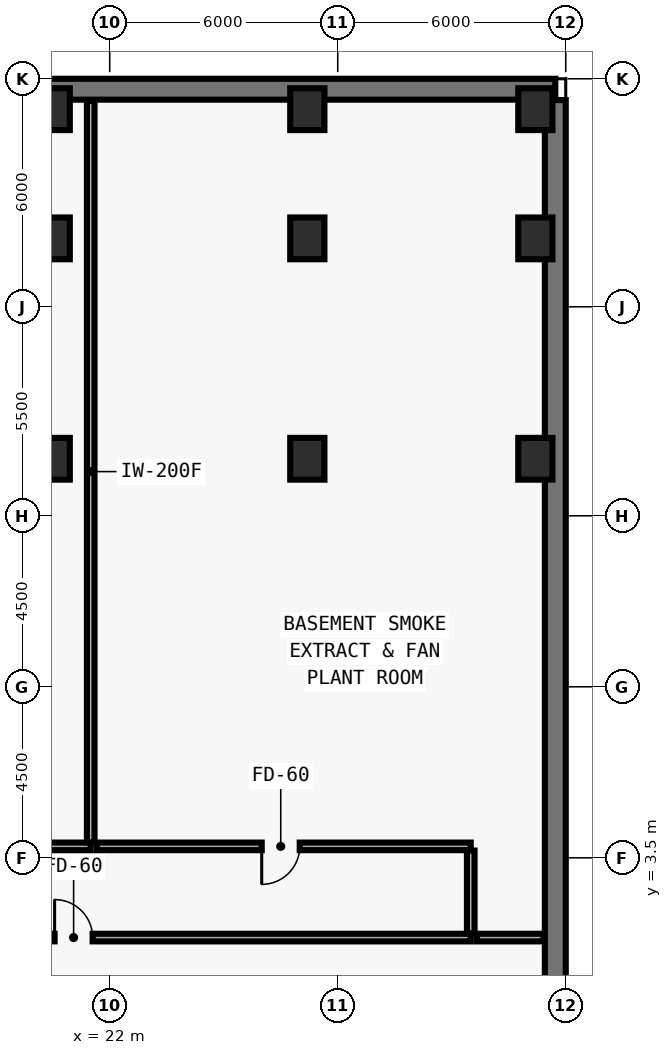
"""IFC4 building model, lengths in metres.
Left out: names, types, materials, properties, quantities, classifications, styles, units other than length and angle.
Written with IfcOpenShell. Run it as: python <this file> out.ifc"""

import sys

from ifc_helpers import new_model, si_unit, direction, frame, frame_2d, origin, origin_2d, place, context, subcontext, project, spatial, rectangle, extrude, element, fill, save


model = new_model("IFC4")
c1 = context("Model", 3, precision=1e-05, world=origin(), true_north=direction((0.0, 1.0)))
c2 = subcontext(c1, "Body", "Model", "MODEL_VIEW")
j1 = project(units=[si_unit("LENGTHUNIT", "METRE"), si_unit("PLANEANGLEUNIT", "RADIAN")], contexts=[c1])
p1 = place(None, origin())
s1 = spatial("IfcSite", under=j1, at=p1, CompositionType="ELEMENT")
p2 = place(p1, origin())
s2 = spatial("IfcBuilding", under=s1, at=p2, CompositionType="ELEMENT")
p3 = place(p2, frame((0.0, 0.0, -9.0)))
s3 = spatial("IfcBuildingStorey", under=s2, at=p3, CompositionType="ELEMENT", Elevation=-9.0)
p4 = place(p3, frame((-33.725, 23.725, 0.0), z_axis=(0.0, 0.0, 1.0), x_axis=(1.0, 0.0, 0.0)))
e1 = element("IfcWall", 1, at=p4, inside=s3, PredefinedType="SOLIDWALL", context=c2, shape_type="SweptSolid", body=[
    extrude(rectangle(XDim=67.45, YDim=0.55, at=frame_2d((33.725, 0.0))), origin(), (0.0, 0.0, 1.0), 4.492),
])
p5 = place(p3, frame((33.725, -23.44, 0.0), z_axis=(0.0, 0.0, 1.0), x_axis=(0.0, 1.0, 0.0)))
e2 = element("IfcWall", 2, at=p5, inside=s3, PredefinedType="SOLIDWALL", context=c2, shape_type="SweptSolid", body=[
    extrude(rectangle(XDim=46.88, YDim=0.55, at=frame_2d((23.44, 0.0))), origin(), (0.0, 0.0, 1.0), 4.492),
])
for number, where, z_axis, x_axis in (
    (3, (20.5, 14.0, 0.0), (0.0, 0.0, 1.0), (1.0, 0.0, 0.0)),
    (4, (20.5, 19.8, 0.0), (0.0, 0.0, 1.0), (1.0, 0.0, 0.0)),
    (5, (20.5, 23.2, 0.0), (0.0, 0.0, 1.0), (1.0, 0.0, 0.0)),
    (6, (27.2, 14.0, 0.0), (0.0, 0.0, 1.0), (1.0, 0.0, 0.0)),
    (7, (27.2, 19.8, 0.0), (0.0, 0.0, 1.0), (1.0, 0.0, 0.0)),
    (8, (27.2, 23.2, 0.0), (0.0, 0.0, 1.0), (1.0, 0.0, 0.0)),
    (9, (33.2, 14.0, 0.0), (0.0, 0.0, 1.0), (1.0, 0.0, 0.0)),
    (10, (33.2, 19.8, 0.0), (0.0, 0.0, 1.0), (1.0, 0.0, 0.0)),
    (11, (33.2, 23.2, 0.0), (0.0, 0.0, 1.0), (1.0, 0.0, 0.0)),
):
    element("IfcColumn", number, at=place(p3, frame(where, z_axis=z_axis, x_axis=x_axis)), inside=s3, PredefinedType="COLUMN", context=c2, shape_type="SweptSolid", body=[
        extrude(rectangle(XDim=0.9, YDim=1.1, at=origin_2d()), origin(), (0.0, 0.0, 1.0), 4.475),
    ])
p6 = place(p3, frame((10.6, 1.4, 0.0), z_axis=(0.0, 0.0, 1.0), x_axis=(1.0, 0.0, 0.0)))
e12 = element("IfcWall", 12, at=p6, inside=s3, PredefinedType="MOVABLE", context=c2, shape_type="SweptSolid", body=[
    extrude(rectangle(XDim=20.9, YDim=0.2, at=frame_2d((10.45, 0.0))), origin(), (0.0, 0.0, 1.0), 4.18),
])
p7 = place(p6, frame((9.95, 0.0, 0.0)))
e13 = element("IfcOpeningElement", 13, at=p7, cuts=e12, PredefinedType="OPENING", context=c2, shape_type="SweptSolid", body=[
    extrude(rectangle(XDim=1.0, YDim=2.1, at=frame_2d((0.5, 1.05))), frame((0.0, 0.11, 0.0), z_axis=(0.0, -1.0, 0.0), x_axis=(1.0, 0.0, 0.0)), (0.0, 0.0, 1.0), 0.22),
])
p8 = place(p3, frame((21.5, 3.8, 0.0), z_axis=(0.0, 0.0, 1.0), x_axis=(-1.0, 0.0, 0.0)))
e14 = element("IfcWall", 14, at=p8, inside=s3, PredefinedType="MOVABLE", context=c2, shape_type="SweptSolid", body=[
    extrude(rectangle(XDim=10.9, YDim=0.2, at=frame_2d((5.45, 0.0))), origin(), (0.0, 0.0, 1.0), 4.18),
])
p9 = place(p8, frame((4.95, 0.0, 0.0)))
e15 = element("IfcOpeningElement", 15, at=p9, cuts=e14, PredefinedType="OPENING", context=c2, shape_type="SweptSolid", body=[
    extrude(rectangle(XDim=1.0, YDim=2.1, at=frame_2d((0.5, 1.05))), frame((0.0, 0.11, 0.0), z_axis=(0.0, -1.0, 0.0), x_axis=(1.0, 0.0, 0.0)), (0.0, 0.0, 1.0), 0.22),
])
p10 = place(p3, frame((31.5, 3.8, 0.0), z_axis=(0.0, 0.0, 1.0), x_axis=(-1.0, 0.0, 0.0)))
e16 = element("IfcWall", 16, at=p10, inside=s3, PredefinedType="MOVABLE", context=c2, shape_type="SweptSolid", body=[
    extrude(rectangle(XDim=9.84, YDim=0.2, at=frame_2d((4.92, 0.0))), origin(), (0.0, 0.0, 1.0), 4.18),
])
p11 = place(p10, frame((4.5, 0.0, 0.0)))
e17 = element("IfcOpeningElement", 17, at=p11, cuts=e16, PredefinedType="OPENING", context=c2, shape_type="SweptSolid", body=[
    extrude(rectangle(XDim=1.0, YDim=2.1, at=frame_2d((0.5, 1.05))), frame((0.0, 0.11, 0.0), z_axis=(0.0, -1.0, 0.0), x_axis=(1.0, 0.0, 0.0)), (0.0, 0.0, 1.0), 0.22),
])
p12 = place(p3, frame((31.5, 1.51, 0.0), z_axis=(0.0, 0.0, 1.0), x_axis=(0.0, 1.0, 0.0)))
e18 = element("IfcWall", 18, at=p12, inside=s3, PredefinedType="MOVABLE", context=c2, shape_type="SweptSolid", body=[
    extrude(rectangle(XDim=2.18, YDim=0.2, at=frame_2d((1.09, 0.0))), origin(), (0.0, 0.0, 1.0), 4.18),
])
p13 = place(p3, frame((31.66, 1.4, 0.0), z_axis=(0.0, 0.0, 1.0), x_axis=(1.0, 0.0, 0.0)))
e19 = element("IfcWall", 19, at=p13, inside=s3, PredefinedType="MOVABLE", context=c2, shape_type="SweptSolid", body=[
    extrude(rectangle(XDim=1.755, YDim=0.2, at=frame_2d((0.877, 0.0))), origin(), (0.0, 0.0, 1.0), 4.18),
])
p14 = place(p3, frame((21.5, 23.415, 0.0), z_axis=(0.0, 0.0, 1.0), x_axis=(0.0, -1.0, 0.0)))
e20 = element("IfcWall", 20, at=p14, inside=s3, PredefinedType="MOVABLE", context=c2, shape_type="SweptSolid", body=[
    extrude(rectangle(XDim=19.505, YDim=0.2, at=frame_2d((9.752, 0.0))), origin(), (0.0, 0.0, 1.0), 4.18),
])
p15 = place(p7, origin())
e21 = element("IfcDoor", 21, at=p15, inside=s3, OperationType="SINGLE_SWING_LEFT", PredefinedType="DOOR", context=c2, shape_type="SweptSolid", body=[
    extrude(rectangle(XDim=1.0, YDim=2.1, at=frame_2d((0.5, 1.05))), frame((0.0, 0.025, 0.0), z_axis=(0.0, -1.0, 0.0), x_axis=(1.0, 0.0, 0.0)), (0.0, 0.0, 1.0), 0.05),
])
fill(e13, e21)
p16 = place(p11, origin())
e22 = element("IfcDoor", 22, at=p16, inside=s3, OperationType="SINGLE_SWING_RIGHT", PredefinedType="DOOR", context=c2, shape_type="SweptSolid", body=[
    extrude(rectangle(XDim=1.0, YDim=2.1, at=frame_2d((0.5, 1.05))), frame((0.0, 0.025, 0.0), z_axis=(0.0, -1.0, 0.0), x_axis=(1.0, 0.0, 0.0)), (0.0, 0.0, 1.0), 0.05),
])
fill(e17, e22)
save(model, sys.argv[1])
